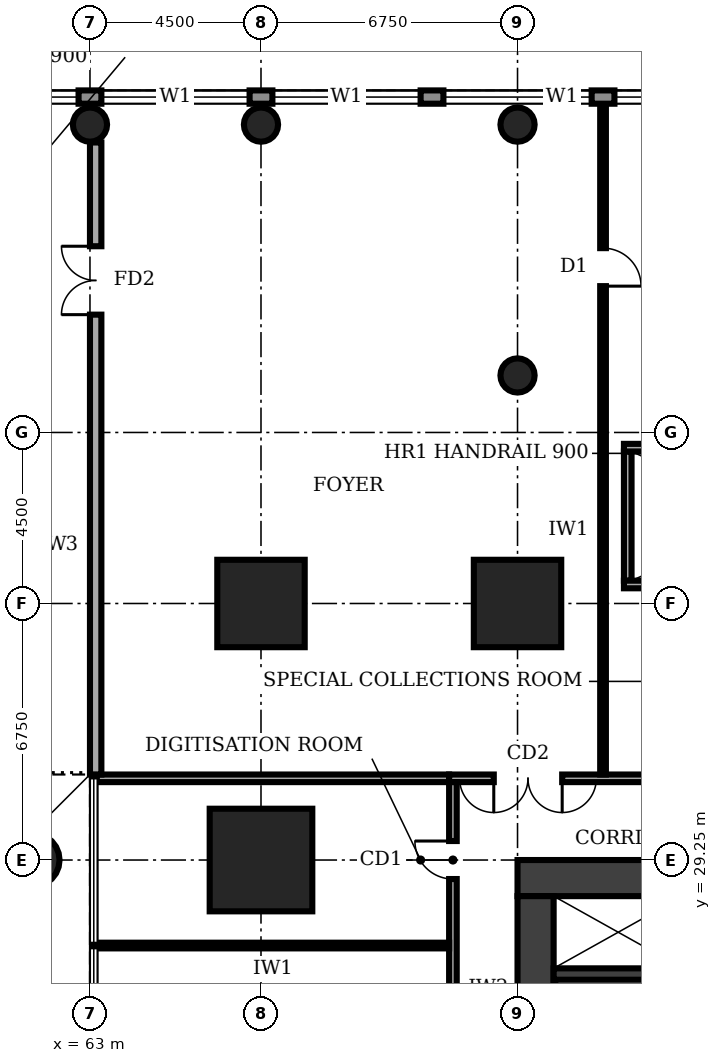
"""IFC4 building model, lengths in metres.
Left out: names, types, materials, properties, quantities, classifications, styles, units other than length and angle.
Written with IfcOpenShell. Run it as: python <this file> out.ifc"""

import sys

from ifc_helpers import new_model, si_unit, direction, frame, frame_2d, origin, origin_2d, place, context, subcontext, project, spatial, rectangle, circle, extrude, element, fill, save


model = new_model("IFC4")
c1 = context("Model", 3, precision=1e-05, world=origin(), true_north=direction((0.0, 1.0)))
c2 = subcontext(c1, "Body", "Model", "MODEL_VIEW")
j1 = project(units=[si_unit("LENGTHUNIT", "METRE"), si_unit("PLANEANGLEUNIT", "RADIAN")], contexts=[c1])
p1 = place(None, origin())
s1 = spatial("IfcSite", under=j1, at=p1, CompositionType="ELEMENT")
p2 = place(p1, origin())
s2 = spatial("IfcBuilding", under=s1, at=p2, CompositionType="ELEMENT")
p3 = place(p2, frame((0.0, 0.0, 11.0)))
s3 = spatial("IfcBuildingStorey", under=s2, at=p3, CompositionType="ELEMENT", Elevation=11.0)
p4 = place(p3, frame((87.75, 28.775, 0.0), z_axis=(0.0, 0.0, 1.0), x_axis=(-1.0, 0.0, 0.0)))
e1 = element("IfcWall", 1, at=p4, inside=s3, PredefinedType="SHEAR", context=c2, shape_type="SweptSolid", body=[
    extrude(rectangle(XDim=13.5, YDim=0.95, at=frame_2d((6.75, 0.0))), origin(), (0.0, 0.0, 1.0), 5.0),
])
p5 = place(p4, frame((4.75, 0.0, 0.0)))
e2 = element("IfcOpeningElement", 2, at=p5, cuts=e1, PredefinedType="OPENING", context=c2, shape_type="SweptSolid", body=[
    extrude(rectangle(XDim=1.8, YDim=2.1, at=frame_2d((0.9, 1.05))), frame((0.0, 0.485, 0.0), z_axis=(0.0, -1.0, 0.0), x_axis=(1.0, 0.0, 0.0)), (0.0, 0.0, 1.0), 0.97),
])
p6 = place(p3, frame((74.725, 28.3, 0.0), z_axis=(0.0, 0.0, 1.0), x_axis=(0.0, -1.0, 0.0)))
e3 = element("IfcWall", 3, at=p6, inside=s3, PredefinedType="SHEAR", context=c2, shape_type="SweptSolid", body=[
    extrude(rectangle(XDim=16.1, YDim=0.95, at=frame_2d((8.05, 0.0))), origin(), (0.0, 0.0, 1.0), 5.0),
])
p7 = place(p3, frame((75.2, 26.25, 0.0), z_axis=(0.0, 0.0, 1.0), x_axis=(1.0, 0.0, 0.0)))
e4 = element("IfcWall", 4, at=p7, inside=s3, PredefinedType="SHEAR", context=c2, shape_type="SweptSolid", body=[
    extrude(rectangle(XDim=3.4, YDim=0.3, at=frame_2d((1.7, 0.0))), origin(), (0.0, 0.0, 1.0), 5.0),
])
p8 = place(p3, frame((67.5, 29.25, 0.0), z_axis=(0.0, 0.0, 1.0), x_axis=(1.0, 0.0, 0.0)))
e5 = element("IfcColumn", 5, at=p8, inside=s3, PredefinedType="COLUMN", context=c2, shape_type="SweptSolid", body=[
    extrude(rectangle(XDim=2.7, YDim=2.7, at=origin_2d()), origin(), (0.0, 0.0, 1.0), 5.0),
])
for number, where, z_axis, x_axis in (
    (6, (67.5, 36.0, 0.0), (0.0, 0.0, 1.0), (1.0, 0.0, 0.0)),
    (7, (74.25, 36.0, 0.0), (0.0, 0.0, 1.0), (1.0, 0.0, 0.0)),
):
    element("IfcColumn", number, at=place(p3, frame(where, z_axis=z_axis, x_axis=x_axis)), inside=s3, PredefinedType="COLUMN", context=c2, shape_type="SweptSolid", body=[
        extrude(rectangle(XDim=2.3, YDim=2.3, at=origin_2d()), origin(), (0.0, 0.0, 1.0), 5.0),
    ])
p9 = place(p3, frame((61.5, 29.25, 0.0), z_axis=(0.0, 0.0, 1.0), x_axis=(1.0, 0.0, 0.0)))
e8 = element("IfcColumn", 8, at=p9, inside=s3, PredefinedType="COLUMN", context=c2, shape_type="SweptSolid", body=[
    extrude(circle(Radius=0.7, at=origin_2d()), origin(), (0.0, 0.0, 1.0), 5.0),
])
for number, where, z_axis, x_axis in (
    (9, (74.25, 42.0, 0.0), (0.0, 0.0, 1.0), (1.0, 0.0, 0.0)),
    (10, (63.0, 48.6, 0.0), (0.0, 0.0, 1.0), (1.0, 0.0, 0.0)),
    (11, (67.5, 48.6, 0.0), (0.0, 0.0, 1.0), (1.0, 0.0, 0.0)),
    (12, (74.25, 48.6, 0.0), (0.0, 0.0, 1.0), (1.0, 0.0, 0.0)),
):
    element("IfcColumn", number, at=place(p3, frame(where, z_axis=z_axis, x_axis=x_axis)), inside=s3, PredefinedType="COLUMN", context=c2, shape_type="SweptSolid", body=[
        extrude(circle(Radius=0.45, at=origin_2d()), origin(), (0.0, 0.0, 1.0), 5.0),
    ])
p10 = place(p3, frame((98.98, 49.325, 0.0), z_axis=(0.0, 0.0, 1.0), x_axis=(-1.0, 0.0, 0.0)))
e13 = element("IfcWall", 13, at=p10, inside=s3, PredefinedType="STANDARD", context=c2, shape_type="SweptSolid", body=[
    extrude(rectangle(XDim=98.96, YDim=0.35, at=frame_2d((49.48, 0.0))), origin(), (0.0, 0.0, 1.0), 4.7),
])
p11 = place(p10, frame((94.71, 0.0, 0.9)))
e14 = element("IfcOpeningElement", 14, at=p11, cuts=e13, PredefinedType="OPENING", context=c2, shape_type="SweptSolid", body=[
    extrude(rectangle(XDim=3.9, YDim=2.2, at=frame_2d((1.95, 1.1))), frame((0.0, 0.185, 0.0), z_axis=(0.0, -1.0, 0.0), x_axis=(1.0, 0.0, 0.0)), (0.0, 0.0, 1.0), 0.37),
])
p12 = place(p10, frame((90.28, 0.0, 0.9)))
e15 = element("IfcOpeningElement", 15, at=p12, cuts=e13, PredefinedType="OPENING", context=c2, shape_type="SweptSolid", body=[
    extrude(rectangle(XDim=3.9, YDim=2.2, at=frame_2d((1.95, 1.1))), frame((0.0, 0.185, 0.0), z_axis=(0.0, -1.0, 0.0), x_axis=(1.0, 0.0, 0.0)), (0.0, 0.0, 1.0), 0.37),
])
p13 = place(p10, frame((85.78, 0.0, 0.9)))
e16 = element("IfcOpeningElement", 16, at=p13, cuts=e13, PredefinedType="OPENING", context=c2, shape_type="SweptSolid", body=[
    extrude(rectangle(XDim=3.9, YDim=2.2, at=frame_2d((1.95, 1.1))), frame((0.0, 0.185, 0.0), z_axis=(0.0, -1.0, 0.0), x_axis=(1.0, 0.0, 0.0)), (0.0, 0.0, 1.0), 0.37),
])
p14 = place(p10, frame((81.28, 0.0, 0.9)))
e17 = element("IfcOpeningElement", 17, at=p14, cuts=e13, PredefinedType="OPENING", context=c2, shape_type="SweptSolid", body=[
    extrude(rectangle(XDim=3.9, YDim=2.2, at=frame_2d((1.95, 1.1))), frame((0.0, 0.185, 0.0), z_axis=(0.0, -1.0, 0.0), x_axis=(1.0, 0.0, 0.0)), (0.0, 0.0, 1.0), 0.37),
])
p15 = place(p10, frame((76.78, 0.0, 0.9)))
e18 = element("IfcOpeningElement", 18, at=p15, cuts=e13, PredefinedType="OPENING", context=c2, shape_type="SweptSolid", body=[
    extrude(rectangle(XDim=3.9, YDim=2.2, at=frame_2d((1.95, 1.1))), frame((0.0, 0.185, 0.0), z_axis=(0.0, -1.0, 0.0), x_axis=(1.0, 0.0, 0.0)), (0.0, 0.0, 1.0), 0.37),
])
p16 = place(p10, frame((72.28, 0.0, 0.9)))
e19 = element("IfcOpeningElement", 19, at=p16, cuts=e13, PredefinedType="OPENING", context=c2, shape_type="SweptSolid", body=[
    extrude(rectangle(XDim=3.9, YDim=2.2, at=frame_2d((1.95, 1.1))), frame((0.0, 0.185, 0.0), z_axis=(0.0, -1.0, 0.0), x_axis=(1.0, 0.0, 0.0)), (0.0, 0.0, 1.0), 0.37),
])
p17 = place(p10, frame((67.78, 0.0, 0.9)))
e20 = element("IfcOpeningElement", 20, at=p17, cuts=e13, PredefinedType="OPENING", context=c2, shape_type="SweptSolid", body=[
    extrude(rectangle(XDim=3.9, YDim=2.2, at=frame_2d((1.95, 1.1))), frame((0.0, 0.185, 0.0), z_axis=(0.0, -1.0, 0.0), x_axis=(1.0, 0.0, 0.0)), (0.0, 0.0, 1.0), 0.37),
])
p18 = place(p10, frame((63.28, 0.0, 0.9)))
e21 = element("IfcOpeningElement", 21, at=p18, cuts=e13, PredefinedType="OPENING", context=c2, shape_type="SweptSolid", body=[
    extrude(rectangle(XDim=3.9, YDim=2.2, at=frame_2d((1.95, 1.1))), frame((0.0, 0.185, 0.0), z_axis=(0.0, -1.0, 0.0), x_axis=(1.0, 0.0, 0.0)), (0.0, 0.0, 1.0), 0.37),
])
p19 = place(p10, frame((58.78, 0.0, 0.9)))
e22 = element("IfcOpeningElement", 22, at=p19, cuts=e13, PredefinedType="OPENING", context=c2, shape_type="SweptSolid", body=[
    extrude(rectangle(XDim=3.9, YDim=2.2, at=frame_2d((1.95, 1.1))), frame((0.0, 0.185, 0.0), z_axis=(0.0, -1.0, 0.0), x_axis=(1.0, 0.0, 0.0)), (0.0, 0.0, 1.0), 0.37),
])
p20 = place(p10, frame((54.28, 0.0, 0.9)))
e23 = element("IfcOpeningElement", 23, at=p20, cuts=e13, PredefinedType="OPENING", context=c2, shape_type="SweptSolid", body=[
    extrude(rectangle(XDim=3.9, YDim=2.2, at=frame_2d((1.95, 1.1))), frame((0.0, 0.185, 0.0), z_axis=(0.0, -1.0, 0.0), x_axis=(1.0, 0.0, 0.0)), (0.0, 0.0, 1.0), 0.37),
])
p21 = place(p10, frame((49.78, 0.0, 0.9)))
e24 = element("IfcOpeningElement", 24, at=p21, cuts=e13, PredefinedType="OPENING", context=c2, shape_type="SweptSolid", body=[
    extrude(rectangle(XDim=3.9, YDim=2.2, at=frame_2d((1.95, 1.1))), frame((0.0, 0.185, 0.0), z_axis=(0.0, -1.0, 0.0), x_axis=(1.0, 0.0, 0.0)), (0.0, 0.0, 1.0), 0.37),
])
p22 = place(p10, frame((45.28, 0.0, 0.9)))
e25 = element("IfcOpeningElement", 25, at=p22, cuts=e13, PredefinedType="OPENING", context=c2, shape_type="SweptSolid", body=[
    extrude(rectangle(XDim=3.9, YDim=2.2, at=frame_2d((1.95, 1.1))), frame((0.0, 0.185, 0.0), z_axis=(0.0, -1.0, 0.0), x_axis=(1.0, 0.0, 0.0)), (0.0, 0.0, 1.0), 0.37),
])
p23 = place(p10, frame((40.78, 0.0, 0.9)))
e26 = element("IfcOpeningElement", 26, at=p23, cuts=e13, PredefinedType="OPENING", context=c2, shape_type="SweptSolid", body=[
    extrude(rectangle(XDim=3.9, YDim=2.2, at=frame_2d((1.95, 1.1))), frame((0.0, 0.185, 0.0), z_axis=(0.0, -1.0, 0.0), x_axis=(1.0, 0.0, 0.0)), (0.0, 0.0, 1.0), 0.37),
])
p24 = place(p10, frame((36.28, 0.0, 0.9)))
e27 = element("IfcOpeningElement", 27, at=p24, cuts=e13, PredefinedType="OPENING", context=c2, shape_type="SweptSolid", body=[
    extrude(rectangle(XDim=3.9, YDim=2.2, at=frame_2d((1.95, 1.1))), frame((0.0, 0.185, 0.0), z_axis=(0.0, -1.0, 0.0), x_axis=(1.0, 0.0, 0.0)), (0.0, 0.0, 1.0), 0.37),
])
p25 = place(p10, frame((31.78, 0.0, 0.9)))
e28 = element("IfcOpeningElement", 28, at=p25, cuts=e13, PredefinedType="OPENING", context=c2, shape_type="SweptSolid", body=[
    extrude(rectangle(XDim=3.9, YDim=2.2, at=frame_2d((1.95, 1.1))), frame((0.0, 0.185, 0.0), z_axis=(0.0, -1.0, 0.0), x_axis=(1.0, 0.0, 0.0)), (0.0, 0.0, 1.0), 0.37),
])
p26 = place(p10, frame((27.28, 0.0, 0.9)))
e29 = element("IfcOpeningElement", 29, at=p26, cuts=e13, PredefinedType="OPENING", context=c2, shape_type="SweptSolid", body=[
    extrude(rectangle(XDim=3.9, YDim=2.2, at=frame_2d((1.95, 1.1))), frame((0.0, 0.185, 0.0), z_axis=(0.0, -1.0, 0.0), x_axis=(1.0, 0.0, 0.0)), (0.0, 0.0, 1.0), 0.37),
])
p27 = place(p10, frame((22.78, 0.0, 0.9)))
e30 = element("IfcOpeningElement", 30, at=p27, cuts=e13, PredefinedType="OPENING", context=c2, shape_type="SweptSolid", body=[
    extrude(rectangle(XDim=3.9, YDim=2.2, at=frame_2d((1.95, 1.1))), frame((0.0, 0.185, 0.0), z_axis=(0.0, -1.0, 0.0), x_axis=(1.0, 0.0, 0.0)), (0.0, 0.0, 1.0), 0.37),
])
p28 = place(p10, frame((18.28, 0.0, 0.9)))
e31 = element("IfcOpeningElement", 31, at=p28, cuts=e13, PredefinedType="OPENING", context=c2, shape_type="SweptSolid", body=[
    extrude(rectangle(XDim=3.9, YDim=2.2, at=frame_2d((1.95, 1.1))), frame((0.0, 0.185, 0.0), z_axis=(0.0, -1.0, 0.0), x_axis=(1.0, 0.0, 0.0)), (0.0, 0.0, 1.0), 0.37),
])
p29 = place(p10, frame((13.78, 0.0, 0.9)))
e32 = element("IfcOpeningElement", 32, at=p29, cuts=e13, PredefinedType="OPENING", context=c2, shape_type="SweptSolid", body=[
    extrude(rectangle(XDim=3.9, YDim=2.2, at=frame_2d((1.95, 1.1))), frame((0.0, 0.185, 0.0), z_axis=(0.0, -1.0, 0.0), x_axis=(1.0, 0.0, 0.0)), (0.0, 0.0, 1.0), 0.37),
])
p30 = place(p10, frame((9.28, 0.0, 0.9)))
e33 = element("IfcOpeningElement", 33, at=p30, cuts=e13, PredefinedType="OPENING", context=c2, shape_type="SweptSolid", body=[
    extrude(rectangle(XDim=3.9, YDim=2.2, at=frame_2d((1.95, 1.1))), frame((0.0, 0.185, 0.0), z_axis=(0.0, -1.0, 0.0), x_axis=(1.0, 0.0, 0.0)), (0.0, 0.0, 1.0), 0.37),
])
p31 = place(p10, frame((4.78, 0.0, 0.9)))
e34 = element("IfcOpeningElement", 34, at=p31, cuts=e13, PredefinedType="OPENING", context=c2, shape_type="SweptSolid", body=[
    extrude(rectangle(XDim=3.9, YDim=2.2, at=frame_2d((1.95, 1.1))), frame((0.0, 0.185, 0.0), z_axis=(0.0, -1.0, 0.0), x_axis=(1.0, 0.0, 0.0)), (0.0, 0.0, 1.0), 0.37),
])
p32 = place(p3, frame((89.35, 31.4, 0.0), z_axis=(0.0, 0.0, 1.0), x_axis=(-1.0, 0.0, 0.0)))
e35 = element("IfcWall", 35, at=p32, inside=s3, PredefinedType="SOLIDWALL", context=c2, shape_type="SweptSolid", body=[
    extrude(rectangle(XDim=16.9, YDim=0.2, at=frame_2d((8.45, 0.0))), origin(), (0.0, 0.0, 1.0), 4.7),
])
p33 = place(p32, frame((13.925, 0.0, 0.0)))
e36 = element("IfcOpeningElement", 36, at=p33, cuts=e35, PredefinedType="OPENING", context=c2, shape_type="SweptSolid", body=[
    extrude(rectangle(XDim=1.8, YDim=2.1, at=frame_2d((0.9, 1.05))), frame((0.0, 0.11, 0.0), z_axis=(0.0, -1.0, 0.0), x_axis=(1.0, 0.0, 0.0)), (0.0, 0.0, 1.0), 0.22),
])
p34 = place(p32, frame((10.1, 0.0, 0.0)))
e37 = element("IfcOpeningElement", 37, at=p34, cuts=e35, PredefinedType="OPENING", context=c2, shape_type="SweptSolid", body=[
    extrude(rectangle(XDim=1.0, YDim=2.1, at=frame_2d((0.5, 1.05))), frame((0.0, 0.11, 0.0), z_axis=(0.0, -1.0, 0.0), x_axis=(1.0, 0.0, 0.0)), (0.0, 0.0, 1.0), 0.22),
])
p35 = place(p32, frame((0.925, 0.0, 0.0)))
e38 = element("IfcOpeningElement", 38, at=p35, cuts=e35, PredefinedType="OPENING", context=c2, shape_type="SweptSolid", body=[
    extrude(rectangle(XDim=1.8, YDim=2.1, at=frame_2d((0.9, 1.05))), frame((0.0, 0.11, 0.0), z_axis=(0.0, -1.0, 0.0), x_axis=(1.0, 0.0, 0.0)), (0.0, 0.0, 1.0), 0.22),
])
p36 = place(p32, frame((5.6, 0.0, 0.0)))
e39 = element("IfcOpeningElement", 39, at=p36, cuts=e35, PredefinedType="OPENING", context=c2, shape_type="SweptSolid", body=[
    extrude(rectangle(XDim=1.0, YDim=2.1, at=frame_2d((0.5, 1.05))), frame((0.0, 0.11, 0.0), z_axis=(0.0, -1.0, 0.0), x_axis=(1.0, 0.0, 0.0)), (0.0, 0.0, 1.0), 0.22),
])
p37 = place(p3, frame((72.55, 31.3, 0.0), z_axis=(0.0, 0.0, 1.0), x_axis=(0.0, -1.0, 0.0)))
e40 = element("IfcWall", 40, at=p37, inside=s3, PredefinedType="SOLIDWALL", context=c2, shape_type="SweptSolid", body=[
    extrude(rectangle(XDim=22.3, YDim=0.2, at=frame_2d((11.15, 0.0))), origin(), (0.0, 0.0, 1.0), 4.7),
])
p38 = place(p37, frame((19.55, 0.0, 0.0)))
e41 = element("IfcOpeningElement", 41, at=p38, cuts=e40, PredefinedType="OPENING", context=c2, shape_type="SweptSolid", body=[
    extrude(rectangle(XDim=1.0, YDim=2.1, at=frame_2d((0.5, 1.05))), frame((0.0, 0.11, 0.0), z_axis=(0.0, -1.0, 0.0), x_axis=(1.0, 0.0, 0.0)), (0.0, 0.0, 1.0), 0.22),
])
p39 = place(p37, frame((15.05, 0.0, 0.0)))
e42 = element("IfcOpeningElement", 42, at=p39, cuts=e40, PredefinedType="OPENING", context=c2, shape_type="SweptSolid", body=[
    extrude(rectangle(XDim=1.0, YDim=2.1, at=frame_2d((0.5, 1.05))), frame((0.0, 0.11, 0.0), z_axis=(0.0, -1.0, 0.0), x_axis=(1.0, 0.0, 0.0)), (0.0, 0.0, 1.0), 0.22),
])
p40 = place(p37, frame((8.3, 0.0, 0.0)))
e43 = element("IfcOpeningElement", 43, at=p40, cuts=e40, PredefinedType="OPENING", context=c2, shape_type="SweptSolid", body=[
    extrude(rectangle(XDim=1.0, YDim=2.1, at=frame_2d((0.5, 1.05))), frame((0.0, 0.11, 0.0), z_axis=(0.0, -1.0, 0.0), x_axis=(1.0, 0.0, 0.0)), (0.0, 0.0, 1.0), 0.22),
])
p41 = place(p37, frame((1.55, 0.0, 0.0)))
e44 = element("IfcOpeningElement", 44, at=p41, cuts=e40, PredefinedType="OPENING", context=c2, shape_type="SweptSolid", body=[
    extrude(rectangle(XDim=1.0, YDim=2.1, at=frame_2d((0.5, 1.05))), frame((0.0, 0.11, 0.0), z_axis=(0.0, -1.0, 0.0), x_axis=(1.0, 0.0, 0.0)), (0.0, 0.0, 1.0), 0.22),
])
p42 = place(p3, frame((63.18, 31.4, 0.0), z_axis=(0.0, 0.0, 1.0), x_axis=(1.0, 0.0, 0.0)))
e45 = element("IfcWall", 45, at=p42, inside=s3, PredefinedType="SOLIDWALL", context=c2, shape_type="SweptSolid", body=[
    extrude(rectangle(XDim=9.27, YDim=0.2, at=frame_2d((4.635, 0.0))), origin(), (0.0, 0.0, 1.0), 4.7),
])
p43 = place(p3, frame((76.5, 31.5, 0.0), z_axis=(0.0, 0.0, 1.0), x_axis=(0.0, 1.0, 0.0)))
e46 = element("IfcWall", 46, at=p43, inside=s3, PredefinedType="PARTITIONING", context=c2, shape_type="SweptSolid", body=[
    extrude(rectangle(XDim=17.7, YDim=0.15, at=frame_2d((8.85, 0.0))), origin(), (0.0, 0.0, 1.0), 4.7),
])
p44 = place(p43, frame((12.85, 0.0, 0.0)))
e47 = element("IfcOpeningElement", 47, at=p44, cuts=e46, PredefinedType="OPENING", context=c2, shape_type="SweptSolid", body=[
    extrude(rectangle(XDim=1.0, YDim=2.1, at=frame_2d((0.5, 1.05))), frame((0.0, 0.085, 0.0), z_axis=(0.0, -1.0, 0.0), x_axis=(1.0, 0.0, 0.0)), (0.0, 0.0, 1.0), 0.17),
])
p45 = place(p3, frame((63.18, 27.0, 0.0), z_axis=(0.0, 0.0, 1.0), x_axis=(1.0, 0.0, 0.0)))
e48 = element("IfcWall", 48, at=p45, inside=s3, PredefinedType="PARTITIONING", context=c2, shape_type="SweptSolid", body=[
    extrude(rectangle(XDim=9.27, YDim=0.15, at=frame_2d((4.635, 0.0))), origin(), (0.0, 0.0, 1.0), 4.7),
])
p46 = place(p3, frame((77.05, 36.5, 0.0), z_axis=(0.0, 0.0, 1.0), x_axis=(1.0, 0.0, 0.0)))
e49 = element("IfcWall", 49, at=p46, inside=s3, PredefinedType="SOLIDWALL", context=c2, shape_type="SweptSolid", body=[
    extrude(rectangle(XDim=7.9, YDim=0.2, at=frame_2d((3.95, 0.0))), origin(), (0.0, 0.0, 1.0), 4.7),
])
p47 = place(p46, frame((6.3, 0.0, 0.0)))
e50 = element("IfcOpeningElement", 50, at=p47, cuts=e49, PredefinedType="OPENING", context=c2, shape_type="SweptSolid", body=[
    extrude(rectangle(XDim=1.0, YDim=2.1, at=frame_2d((0.5, 1.05))), frame((0.0, 0.11, 0.0), z_axis=(0.0, -1.0, 0.0), x_axis=(1.0, 0.0, 0.0)), (0.0, 0.0, 1.0), 0.22),
])
p48 = place(p3, frame((77.05, 40.1, 0.0), z_axis=(0.0, 0.0, 1.0), x_axis=(1.0, 0.0, 0.0)))
e51 = element("IfcWall", 51, at=p48, inside=s3, PredefinedType="SOLIDWALL", context=c2, shape_type="SweptSolid", body=[
    extrude(rectangle(XDim=7.9, YDim=0.2, at=frame_2d((3.95, 0.0))), origin(), (0.0, 0.0, 1.0), 4.7),
])
p49 = place(p3, frame((77.15, 36.6, 0.0), z_axis=(0.0, 0.0, 1.0), x_axis=(0.0, 1.0, 0.0)))
e52 = element("IfcWall", 52, at=p49, inside=s3, PredefinedType="SOLIDWALL", context=c2, shape_type="SweptSolid", body=[
    extrude(rectangle(XDim=3.4, YDim=0.2, at=frame_2d((1.7, 0.0))), origin(), (0.0, 0.0, 1.0), 4.7),
])
p50 = place(p3, frame((63.15, 31.5, 0.0), z_axis=(0.0, 0.0, 1.0), x_axis=(0.0, 1.0, 0.0)))
e53 = element("IfcWall", 53, at=p50, inside=s3, PredefinedType="SOLIDWALL", context=c2, shape_type="SweptSolid", body=[
    extrude(rectangle(XDim=16.63, YDim=0.3, at=frame_2d((8.315, 0.0))), origin(), (0.0, 0.0, 1.0), 4.7),
])
p51 = place(p50, frame((12.1, 0.0, 0.0)))
e54 = element("IfcOpeningElement", 54, at=p51, cuts=e53, PredefinedType="OPENING", context=c2, shape_type="SweptSolid", body=[
    extrude(rectangle(XDim=1.8, YDim=2.1, at=frame_2d((0.9, 1.05))), frame((0.0, 0.16, 0.0), z_axis=(0.0, -1.0, 0.0), x_axis=(1.0, 0.0, 0.0)), (0.0, 0.0, 1.0), 0.32),
])
p52 = place(p24, origin())
e55 = element("IfcWindow", 55, at=p52, inside=s3, PartitioningType="SINGLE_PANEL", PredefinedType="WINDOW", context=c2, shape_type="SweptSolid", body=[
    extrude(rectangle(XDim=3.9, YDim=2.2, at=frame_2d((1.95, 1.1))), frame((0.0, 0.03, 0.0), z_axis=(0.0, -1.0, 0.0), x_axis=(1.0, 0.0, 0.0)), (0.0, 0.0, 1.0), 0.06),
])
fill(e27, e55)
p53 = place(p25, origin())
e56 = element("IfcWindow", 56, at=p53, inside=s3, PartitioningType="SINGLE_PANEL", PredefinedType="WINDOW", context=c2, shape_type="SweptSolid", body=[
    extrude(rectangle(XDim=3.9, YDim=2.2, at=frame_2d((1.95, 1.1))), frame((0.0, 0.03, 0.0), z_axis=(0.0, -1.0, 0.0), x_axis=(1.0, 0.0, 0.0)), (0.0, 0.0, 1.0), 0.06),
])
fill(e28, e56)
p54 = place(p26, origin())
e57 = element("IfcWindow", 57, at=p54, inside=s3, PartitioningType="SINGLE_PANEL", PredefinedType="WINDOW", context=c2, shape_type="SweptSolid", body=[
    extrude(rectangle(XDim=3.9, YDim=2.2, at=frame_2d((1.95, 1.1))), frame((0.0, 0.03, 0.0), z_axis=(0.0, -1.0, 0.0), x_axis=(1.0, 0.0, 0.0)), (0.0, 0.0, 1.0), 0.06),
])
fill(e29, e57)
p55 = place(p27, origin())
e58 = element("IfcWindow", 58, at=p55, inside=s3, PartitioningType="SINGLE_PANEL", PredefinedType="WINDOW", context=c2, shape_type="SweptSolid", body=[
    extrude(rectangle(XDim=3.9, YDim=2.2, at=frame_2d((1.95, 1.1))), frame((0.0, 0.03, 0.0), z_axis=(0.0, -1.0, 0.0), x_axis=(1.0, 0.0, 0.0)), (0.0, 0.0, 1.0), 0.06),
])
fill(e30, e58)
p56 = place(p28, origin())
e59 = element("IfcWindow", 59, at=p56, inside=s3, PartitioningType="SINGLE_PANEL", PredefinedType="WINDOW", context=c2, shape_type="SweptSolid", body=[
    extrude(rectangle(XDim=3.9, YDim=2.2, at=frame_2d((1.95, 1.1))), frame((0.0, 0.03, 0.0), z_axis=(0.0, -1.0, 0.0), x_axis=(1.0, 0.0, 0.0)), (0.0, 0.0, 1.0), 0.06),
])
fill(e31, e59)
p57 = place(p33, origin())
e60 = element("IfcDoor", 60, at=p57, inside=s3, OperationType="DOUBLE_DOOR_SINGLE_SWING", PredefinedType="DOOR", context=c2, shape_type="SweptSolid", body=[
    extrude(rectangle(XDim=1.8, YDim=2.1, at=frame_2d((0.9, 1.05))), frame((0.0, 0.025, 0.0), z_axis=(0.0, -1.0, 0.0), x_axis=(1.0, 0.0, 0.0)), (0.0, 0.0, 1.0), 0.05),
])
fill(e36, e60)
p58 = place(p41, frame((1.0, 0.0, 0.0), z_axis=(0.0, 0.0, 1.0), x_axis=(-1.0, 0.0, 0.0)))
e61 = element("IfcDoor", 61, at=p58, inside=s3, OperationType="SINGLE_SWING_RIGHT", PredefinedType="DOOR", context=c2, shape_type="SweptSolid", body=[
    extrude(rectangle(XDim=1.0, YDim=2.1, at=frame_2d((0.5, 1.05))), frame((0.0, 0.025, 0.0), z_axis=(0.0, -1.0, 0.0), x_axis=(1.0, 0.0, 0.0)), (0.0, 0.0, 1.0), 0.05),
])
fill(e44, e61)
p59 = place(p44, frame((1.0, 0.0, 0.0), z_axis=(0.0, 0.0, 1.0), x_axis=(-1.0, 0.0, 0.0)))
e62 = element("IfcDoor", 62, at=p59, inside=s3, OperationType="SINGLE_SWING_RIGHT", PredefinedType="DOOR", context=c2, shape_type="SweptSolid", body=[
    extrude(rectangle(XDim=1.0, YDim=2.1, at=frame_2d((0.5, 1.05))), frame((0.0, 0.025, 0.0), z_axis=(0.0, -1.0, 0.0), x_axis=(1.0, 0.0, 0.0)), (0.0, 0.0, 1.0), 0.05),
])
fill(e47, e62)
p60 = place(p51, origin())
e63 = element("IfcDoor", 63, at=p60, inside=s3, OperationType="DOUBLE_DOOR_SINGLE_SWING", PredefinedType="DOOR", context=c2, shape_type="SweptSolid", body=[
    extrude(rectangle(XDim=1.8, YDim=2.1, at=frame_2d((0.9, 1.05))), frame((0.0, 0.025, 0.0), z_axis=(0.0, -1.0, 0.0), x_axis=(1.0, 0.0, 0.0)), (0.0, 0.0, 1.0), 0.05),
])
fill(e54, e63)
save(model, sys.argv[1])
